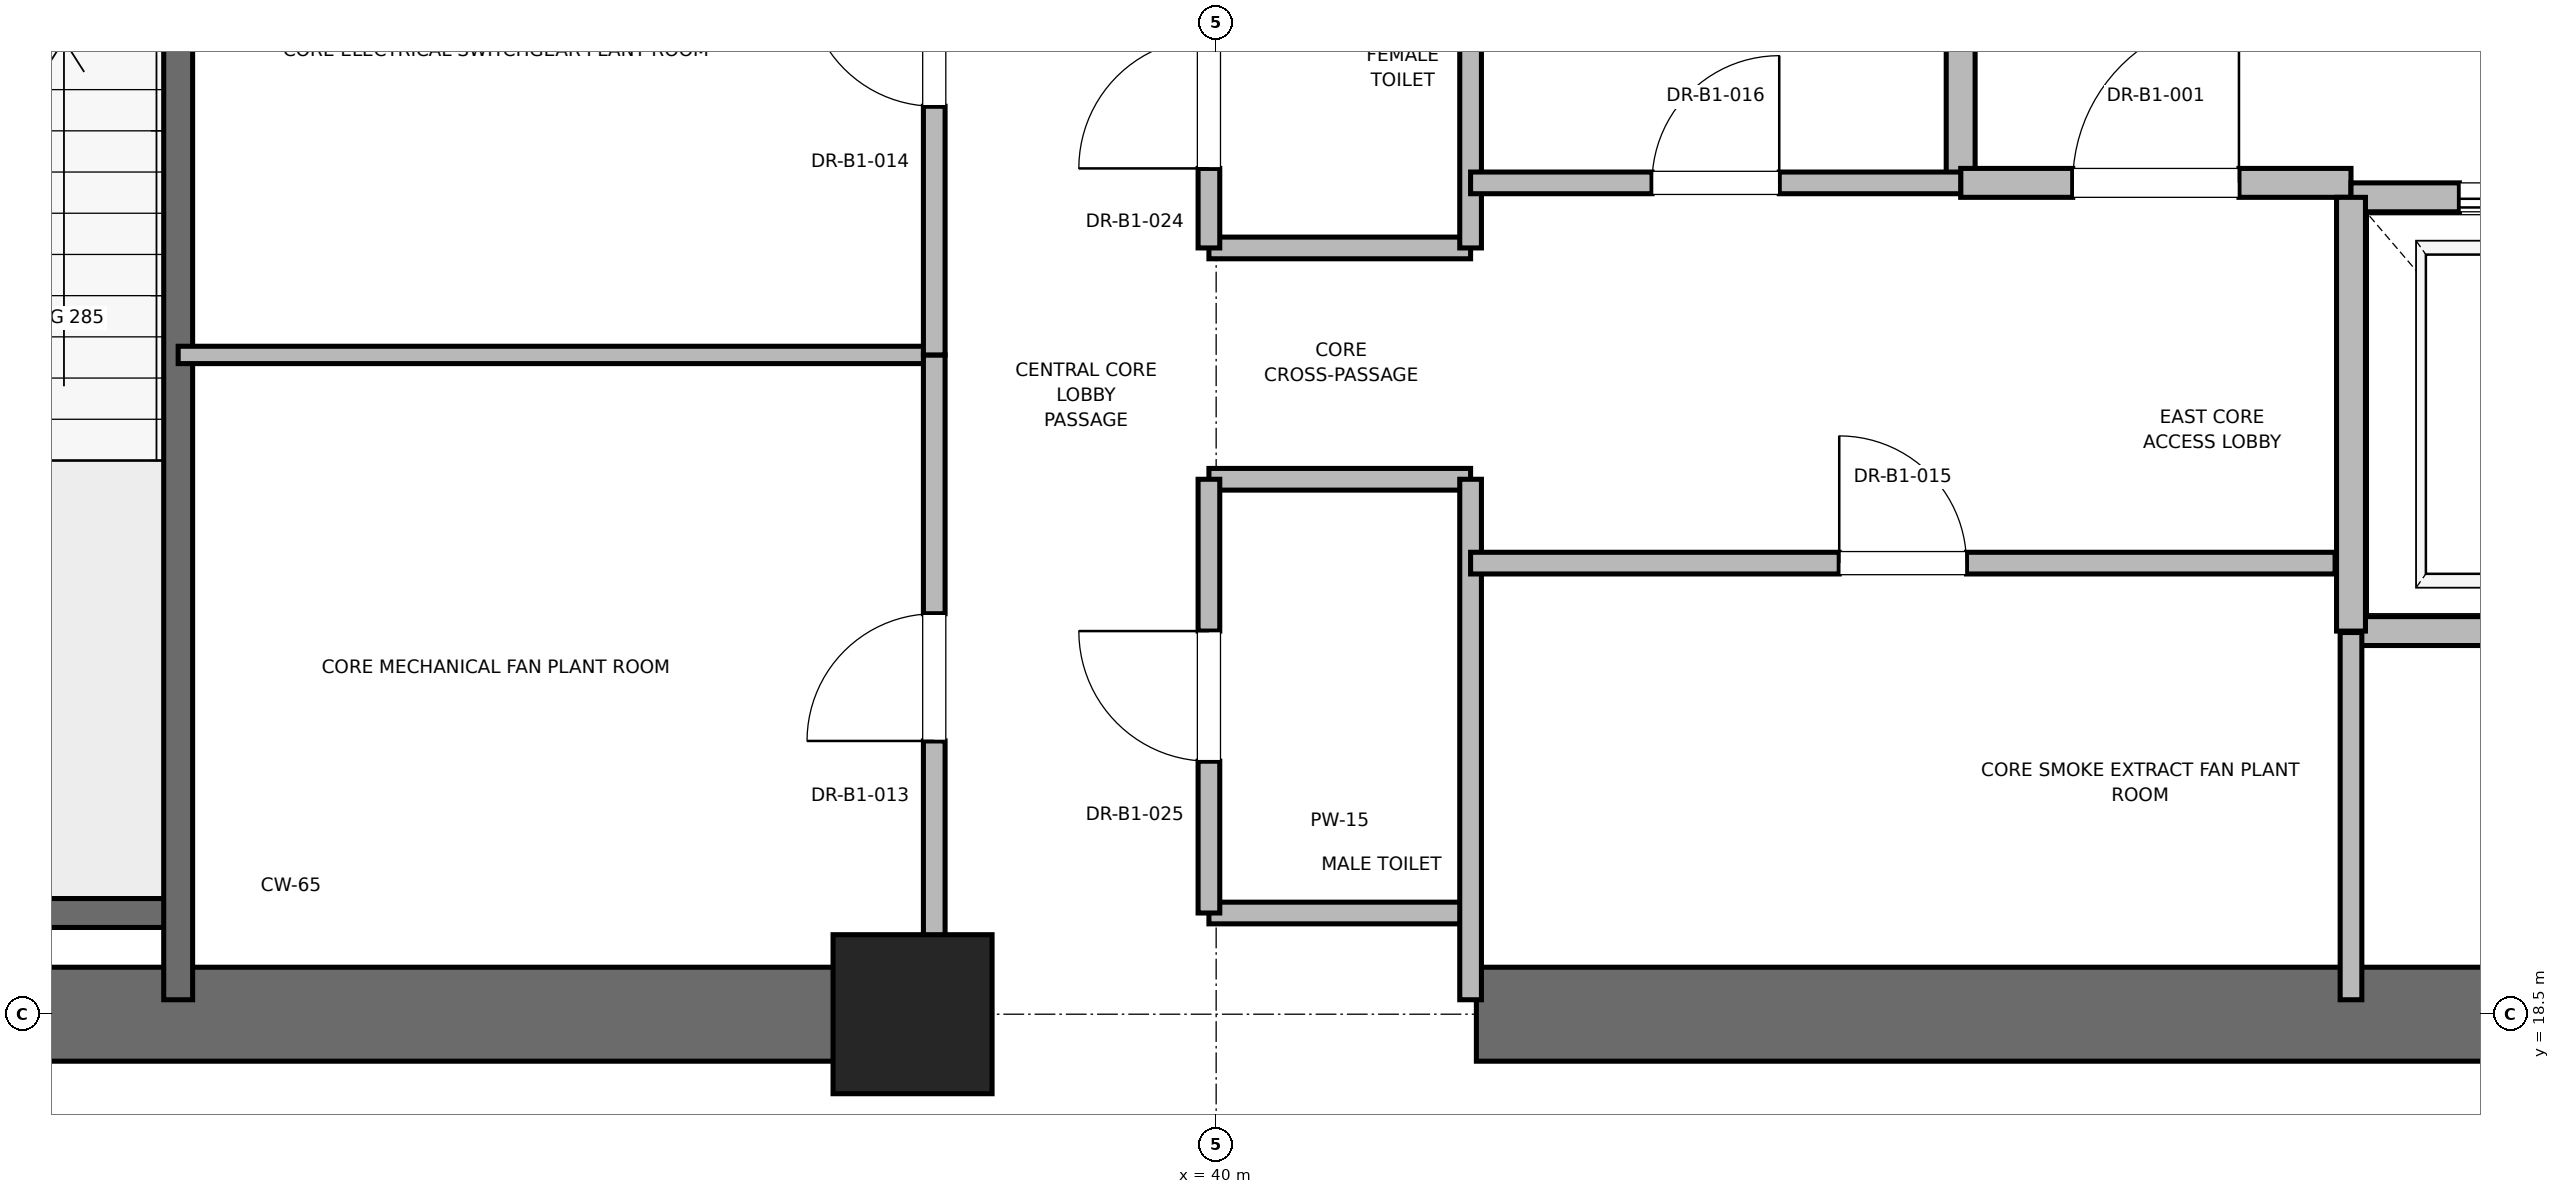
"""IFC4 building model, lengths in metres.
Left out: names, types, materials, properties, quantities, classifications, styles, units other than length and angle.
Written with IfcOpenShell. Run it as: python <this file> out.ifc"""

import sys

from ifc_helpers import new_model, si_unit, direction, frame, frame_2d, origin, origin_2d, place, context, subcontext, project, spatial, rectangle, extrude, element, fill, save


model = new_model("IFC4")
c1 = context("Model", 3, precision=1e-05, world=origin(), true_north=direction((0.0, 1.0)))
c2 = subcontext(c1, "Body", "Model", "MODEL_VIEW")
j1 = project(units=[si_unit("LENGTHUNIT", "METRE"), si_unit("PLANEANGLEUNIT", "RADIAN")], contexts=[c1])
p1 = place(None, origin())
s1 = spatial("IfcSite", under=j1, at=p1, CompositionType="ELEMENT")
p2 = place(p1, origin())
s2 = spatial("IfcBuilding", under=s1, at=p2, CompositionType="ELEMENT")
p3 = place(p2, frame((0.0, 0.0, -4.5)))
s3 = spatial("IfcBuildingStorey", under=s2, at=p3, CompositionType="ELEMENT", Elevation=-4.5)
p4 = place(p3, frame((37.9, 18.5, 0.0), z_axis=(0.0, 0.0, 1.0), x_axis=(1.0, 0.0, 0.0)))
e1 = element("IfcColumn", 1, at=p4, inside=s3, PredefinedType="PILASTER", context=c2, shape_type="SweptSolid", body=[
    extrude(rectangle(XDim=1.1, YDim=1.1, at=origin_2d()), origin(), (0.0, 0.0, 1.0), 4.5),
])
for number, where, z_axis, x_axis in (
    (2, (29.0, 18.5, 0.0), (0.0, 0.0, 1.0), (1.0, 0.0, 0.0)),
    (3, (41.8, 18.5, 0.0), (0.0, 0.0, 1.0), (1.0, 0.0, 0.0)),
):
    element("IfcWall", number, at=place(p3, frame(where, z_axis=z_axis, x_axis=x_axis)), inside=s3, PredefinedType="SHEAR", context=c2, shape_type="SweptSolid", body=[
        extrude(rectangle(XDim=9.2, YDim=0.65, at=frame_2d((4.6, 0.0))), origin(), (0.0, 0.0, 1.0), 4.22),
    ])
p5 = place(p3, frame((29.7, 19.2, 0.0), z_axis=(0.0, 0.0, 1.0), x_axis=(1.0, 0.0, 0.0)))
e4 = element("IfcWall", 4, at=p5, inside=s3, PredefinedType="SOLIDWALL", context=c2, shape_type="SweptSolid", body=[
    extrude(rectangle(XDim=3.12, YDim=0.2, at=frame_2d((1.56, 0.0))), origin(), (0.0, 0.0, 1.0), 4.22),
])
p6 = place(p3, frame((32.82, 18.6, 0.0), z_axis=(0.0, 0.0, 1.0), x_axis=(0.0, 1.0, 0.0)))
e5 = element("IfcWall", 5, at=p6, inside=s3, PredefinedType="SOLIDWALL", context=c2, shape_type="SweptSolid", body=[
    extrude(rectangle(XDim=8.78, YDim=0.2, at=frame_2d((4.39, 0.0))), origin(), (0.0, 0.0, 1.0), 4.22),
])
p7 = place(p3, frame((45.15, 24.25, 0.0), z_axis=(0.0, 0.0, 1.0), x_axis=(0.0, 1.0, 0.0)))
e6 = element("IfcWall", 6, at=p7, inside=s3, PredefinedType="PARTITIONING", context=c2, shape_type="SweptSolid", body=[
    extrude(rectangle(XDim=3.37, YDim=0.2, at=frame_2d((1.685, 0.0))), origin(), (0.0, 0.0, 1.0), 4.22),
])
p8 = place(p3, frame((45.15, 24.25, 0.0), z_axis=(0.0, 0.0, 1.0), x_axis=(1.0, 0.0, 0.0)))
e7 = element("IfcWall", 7, at=p8, inside=s3, PredefinedType="PARTITIONING", context=c2, shape_type="SweptSolid", body=[
    extrude(rectangle(XDim=2.7, YDim=0.2, at=frame_2d((1.35, 0.0))), origin(), (0.0, 0.0, 1.0), 4.22),
])
p9 = place(p8, frame((0.775, 0.0, 0.0)))
e8 = element("IfcOpeningElement", 8, at=p9, cuts=e7, PredefinedType="OPENING", context=c2, shape_type="SweptSolid", body=[
    extrude(rectangle(XDim=1.15, YDim=2.2, at=frame_2d((0.575, 1.1))), frame((0.0, 0.1, 0.0), z_axis=(0.0, -1.0, 0.0), x_axis=(1.0, 0.0, 0.0)), (0.0, 0.0, 1.0), 0.2),
])
p10 = place(p3, frame((47.85, 21.15, 0.0), z_axis=(0.0, 0.0, 1.0), x_axis=(1.0, 0.0, 0.0)))
e9 = element("IfcWall", 9, at=p10, inside=s3, PredefinedType="SOLIDWALL", context=c2, shape_type="SweptSolid", body=[
    extrude(rectangle(XDim=2.6, YDim=0.2, at=frame_2d((1.3, 0.0))), origin(), (0.0, 0.0, 1.0), 4.22),
])
p11 = place(p3, frame((50.45, 24.15, 0.0), z_axis=(0.0, 0.0, 1.0), x_axis=(-1.0, 0.0, 0.0)))
e10 = element("IfcWall", 10, at=p11, inside=s3, PredefinedType="SOLIDWALL", context=c2, shape_type="SweptSolid", body=[
    extrude(rectangle(XDim=2.6, YDim=0.2, at=frame_2d((1.3, 0.0))), origin(), (0.0, 0.0, 1.0), 3.0),
])
p12 = place(p11, frame((0.75, 0.0, 0.0)))
e11 = element("IfcOpeningElement", 11, at=p12, cuts=e10, PredefinedType="OPENING", context=c2, shape_type="SweptSolid", body=[
    extrude(rectangle(XDim=1.1, YDim=2.2, at=frame_2d((0.55, 1.1))), frame((0.0, 0.1, 0.0), z_axis=(0.0, -1.0, 0.0), x_axis=(1.0, 0.0, 0.0)), (0.0, 0.0, 1.0), 0.2),
])
p13 = place(p3, frame((47.85, 24.15, 0.0), z_axis=(0.0, 0.0, 1.0), x_axis=(0.0, -1.0, 0.0)))
e12 = element("IfcWall", 12, at=p13, inside=s3, PredefinedType="SOLIDWALL", context=c2, shape_type="SweptSolid", body=[
    extrude(rectangle(XDim=3.0, YDim=0.2, at=frame_2d((1.5, 0.0))), origin(), (0.0, 0.0, 1.0), 4.22),
])
for number, where, z_axis, x_axis in (
    (13, (39.95, 19.2, 0.0), (0.0, 0.0, 1.0), (1.0, 0.0, 0.0)),
    (14, (39.95, 22.2, 0.0), (0.0, 0.0, 1.0), (1.0, 0.0, 0.0)),
    (15, (39.95, 23.8, 0.0), (0.0, 0.0, 1.0), (1.0, 0.0, 0.0)),
):
    element("IfcWall", number, at=place(p3, frame(where, z_axis=z_axis, x_axis=x_axis)), inside=s3, PredefinedType="PARTITIONING", context=c2, shape_type="SweptSolid", body=[
        extrude(rectangle(XDim=1.81, YDim=0.15, at=frame_2d((0.905, 0.0))), origin(), (0.0, 0.0, 1.0), 2.85),
    ])
p14 = place(p3, frame((41.76, 18.6, 0.0), z_axis=(0.0, 0.0, 1.0), x_axis=(0.0, 1.0, 0.0)))
e16 = element("IfcWall", 16, at=p14, inside=s3, PredefinedType="PARTITIONING", context=c2, shape_type="SweptSolid", body=[
    extrude(rectangle(XDim=3.6, YDim=0.15, at=frame_2d((1.8, 0.0))), origin(), (0.0, 0.0, 1.0), 2.85),
])
p15 = place(p3, frame((41.76, 23.8, 0.0), z_axis=(0.0, 0.0, 1.0), x_axis=(0.0, 1.0, 0.0)))
e17 = element("IfcWall", 17, at=p15, inside=s3, PredefinedType="PARTITIONING", context=c2, shape_type="SweptSolid", body=[
    extrude(rectangle(XDim=4.0, YDim=0.15, at=frame_2d((2.0, 0.0))), origin(), (0.0, 0.0, 1.0), 2.85),
])
p16 = place(p3, frame((39.95, 19.2, 0.0), z_axis=(0.0, 0.0, 1.0), x_axis=(0.0, 1.0, 0.0)))
e18 = element("IfcWall", 18, at=p16, inside=s3, PredefinedType="PARTITIONING", context=c2, shape_type="SweptSolid", body=[
    extrude(rectangle(XDim=3.0, YDim=0.15, at=frame_2d((1.5, 0.0))), origin(), (0.0, 0.0, 1.0), 2.85),
])
p17 = place(p16, frame((1.05, 0.0, 0.0)))
e19 = element("IfcOpeningElement", 19, at=p17, cuts=e18, PredefinedType="OPENING", context=c2, shape_type="SweptSolid", body=[
    extrude(rectangle(XDim=0.9, YDim=2.1, at=frame_2d((0.45, 1.05))), frame((0.0, 0.075, 0.0), z_axis=(0.0, -1.0, 0.0), x_axis=(1.0, 0.0, 0.0)), (0.0, 0.0, 1.0), 0.15),
])
p18 = place(p3, frame((39.95, 23.8, 0.0), z_axis=(0.0, 0.0, 1.0), x_axis=(0.0, 1.0, 0.0)))
e20 = element("IfcWall", 20, at=p18, inside=s3, PredefinedType="PARTITIONING", context=c2, shape_type="SweptSolid", body=[
    extrude(rectangle(XDim=2.0, YDim=0.15, at=frame_2d((1.0, 0.0))), origin(), (0.0, 0.0, 1.0), 2.85),
])
p19 = place(p18, frame((0.55, 0.0, 0.0)))
e21 = element("IfcOpeningElement", 21, at=p19, cuts=e20, PredefinedType="OPENING", context=c2, shape_type="SweptSolid", body=[
    extrude(rectangle(XDim=0.9, YDim=2.1, at=frame_2d((0.45, 1.05))), frame((0.0, 0.075, 0.0), z_axis=(0.0, -1.0, 0.0), x_axis=(1.0, 0.0, 0.0)), (0.0, 0.0, 1.0), 0.15),
])
p20 = place(p3, frame((32.82, 23.06, 0.0), z_axis=(0.0, 0.0, 1.0), x_axis=(1.0, 0.0, 0.0)))
e22 = element("IfcWall", 22, at=p20, inside=s3, PredefinedType="PARTITIONING", context=c2, shape_type="SweptSolid", body=[
    extrude(rectangle(XDim=5.23, YDim=0.12, at=frame_2d((2.615, 0.0))), origin(), (0.0, 0.0, 1.0), 2.85),
])
p21 = place(p3, frame((38.05, 18.6, 0.0), z_axis=(0.0, 0.0, 1.0), x_axis=(0.0, 1.0, 0.0)))
e23 = element("IfcWall", 23, at=p21, inside=s3, PredefinedType="PARTITIONING", context=c2, shape_type="SweptSolid", body=[
    extrude(rectangle(XDim=4.46, YDim=0.15, at=frame_2d((2.23, 0.0))), origin(), (0.0, 0.0, 1.0), 2.85),
])
p22 = place(p21, frame((1.79, 0.0, 0.0)))
e24 = element("IfcOpeningElement", 24, at=p22, cuts=e23, PredefinedType="OPENING", context=c2, shape_type="SweptSolid", body=[
    extrude(rectangle(XDim=0.88, YDim=2.1, at=frame_2d((0.44, 1.05))), frame((0.0, 0.075, 0.0), z_axis=(0.0, -1.0, 0.0), x_axis=(1.0, 0.0, 0.0)), (0.0, 0.0, 1.0), 0.15),
])
p23 = place(p3, frame((38.05, 23.06, 0.0), z_axis=(0.0, 0.0, 1.0), x_axis=(0.0, 1.0, 0.0)))
e25 = element("IfcWall", 25, at=p23, inside=s3, PredefinedType="PARTITIONING", context=c2, shape_type="SweptSolid", body=[
    extrude(rectangle(XDim=4.32, YDim=0.15, at=frame_2d((2.16, 0.0))), origin(), (0.0, 0.0, 1.0), 2.85),
])
p24 = place(p23, frame((1.72, 0.0, 0.0)))
e26 = element("IfcOpeningElement", 26, at=p24, cuts=e25, PredefinedType="OPENING", context=c2, shape_type="SweptSolid", body=[
    extrude(rectangle(XDim=0.88, YDim=2.1, at=frame_2d((0.44, 1.05))), frame((0.0, 0.075, 0.0), z_axis=(0.0, -1.0, 0.0), x_axis=(1.0, 0.0, 0.0)), (0.0, 0.0, 1.0), 0.15),
])
p25 = place(p3, frame((47.85, 18.6, 0.0), z_axis=(0.0, 0.0, 1.0), x_axis=(0.0, 1.0, 0.0)))
e27 = element("IfcWall", 27, at=p25, inside=s3, PredefinedType="PARTITIONING", context=c2, shape_type="SweptSolid", body=[
    extrude(rectangle(XDim=2.54, YDim=0.15, at=frame_2d((1.27, 0.0))), origin(), (0.0, 0.0, 1.0), 2.85),
])
p26 = place(p3, frame((41.76, 21.62, 0.0), z_axis=(0.0, 0.0, 1.0), x_axis=(1.0, 0.0, 0.0)))
e28 = element("IfcWall", 28, at=p26, inside=s3, PredefinedType="PARTITIONING", context=c2, shape_type="SweptSolid", body=[
    extrude(rectangle(XDim=5.98, YDim=0.15, at=frame_2d((2.99, 0.0))), origin(), (0.0, 0.0, 1.0), 2.85),
])
p27 = place(p26, frame((2.55, 0.0, 0.0)))
e29 = element("IfcOpeningElement", 29, at=p27, cuts=e28, PredefinedType="OPENING", context=c2, shape_type="SweptSolid", body=[
    extrude(rectangle(XDim=0.88, YDim=2.1, at=frame_2d((0.44, 1.05))), frame((0.0, 0.075, 0.0), z_axis=(0.0, -1.0, 0.0), x_axis=(1.0, 0.0, 0.0)), (0.0, 0.0, 1.0), 0.15),
])
p28 = place(p3, frame((41.76, 24.25, 0.0), z_axis=(0.0, 0.0, 1.0), x_axis=(1.0, 0.0, 0.0)))
e30 = element("IfcWall", 30, at=p28, inside=s3, PredefinedType="PARTITIONING", context=c2, shape_type="SweptSolid", body=[
    extrude(rectangle(XDim=3.39, YDim=0.15, at=frame_2d((1.695, 0.0))), origin(), (0.0, 0.0, 1.0), 2.85),
])
p29 = place(p28, frame((1.255, 0.0, 0.0)))
e31 = element("IfcOpeningElement", 31, at=p29, cuts=e30, PredefinedType="OPENING", context=c2, shape_type="SweptSolid", body=[
    extrude(rectangle(XDim=0.88, YDim=2.1, at=frame_2d((0.44, 1.05))), frame((0.0, 0.075, 0.0), z_axis=(0.0, -1.0, 0.0), x_axis=(1.0, 0.0, 0.0)), (0.0, 0.0, 1.0), 0.15),
])
p30 = place(p9, origin())
e32 = element("IfcDoor", 32, at=p30, inside=s3, OperationType="SINGLE_SWING_RIGHT", PredefinedType="DOOR", context=c2, shape_type="SweptSolid", body=[
    extrude(rectangle(XDim=1.15, YDim=2.2, at=frame_2d((0.575, 1.1))), frame((0.0, 0.025, 0.0), z_axis=(0.0, -1.0, 0.0), x_axis=(1.0, 0.0, 0.0)), (0.0, 0.0, 1.0), 0.05),
])
fill(e8, e32)
p31 = place(p12, origin())
e33 = element("IfcDoor", 33, at=p31, inside=s3, OperationType="SLIDING_TO_RIGHT", PredefinedType="DOOR", context=c2, shape_type="SweptSolid", body=[
    extrude(rectangle(XDim=1.1, YDim=2.2, at=frame_2d((0.55, 1.1))), frame((0.0, 0.025, 0.0), z_axis=(0.0, -1.0, 0.0), x_axis=(1.0, 0.0, 0.0)), (0.0, 0.0, 1.0), 0.05),
])
fill(e11, e33)
p32 = place(p17, origin())
e34 = element("IfcDoor", 34, at=p32, inside=s3, OperationType="SINGLE_SWING_RIGHT", PredefinedType="DOOR", context=c2, shape_type="SweptSolid", body=[
    extrude(rectangle(XDim=0.9, YDim=2.1, at=frame_2d((0.45, 1.05))), frame((0.0, 0.025, 0.0), z_axis=(0.0, -1.0, 0.0), x_axis=(1.0, 0.0, 0.0)), (0.0, 0.0, 1.0), 0.05),
])
fill(e19, e34)
p33 = place(p19, origin())
e35 = element("IfcDoor", 35, at=p33, inside=s3, OperationType="SINGLE_SWING_LEFT", PredefinedType="DOOR", context=c2, shape_type="SweptSolid", body=[
    extrude(rectangle(XDim=0.9, YDim=2.1, at=frame_2d((0.45, 1.05))), frame((0.0, 0.025, 0.0), z_axis=(0.0, -1.0, 0.0), x_axis=(1.0, 0.0, 0.0)), (0.0, 0.0, 1.0), 0.05),
])
fill(e21, e35)
p34 = place(p22, origin())
e36 = element("IfcDoor", 36, at=p34, inside=s3, OperationType="SINGLE_SWING_LEFT", PredefinedType="DOOR", context=c2, shape_type="SweptSolid", body=[
    extrude(rectangle(XDim=0.88, YDim=2.1, at=frame_2d((0.44, 1.05))), frame((0.0, 0.025, 0.0), z_axis=(0.0, -1.0, 0.0), x_axis=(1.0, 0.0, 0.0)), (0.0, 0.0, 1.0), 0.05),
])
fill(e24, e36)
p35 = place(p24, origin())
e37 = element("IfcDoor", 37, at=p35, inside=s3, OperationType="SINGLE_SWING_RIGHT", PredefinedType="DOOR", context=c2, shape_type="SweptSolid", body=[
    extrude(rectangle(XDim=0.88, YDim=2.1, at=frame_2d((0.44, 1.05))), frame((0.0, 0.025, 0.0), z_axis=(0.0, -1.0, 0.0), x_axis=(1.0, 0.0, 0.0)), (0.0, 0.0, 1.0), 0.05),
])
fill(e26, e37)
p36 = place(p27, origin())
e38 = element("IfcDoor", 38, at=p36, inside=s3, OperationType="SINGLE_SWING_LEFT", PredefinedType="DOOR", context=c2, shape_type="SweptSolid", body=[
    extrude(rectangle(XDim=0.88, YDim=2.1, at=frame_2d((0.44, 1.05))), frame((0.0, 0.025, 0.0), z_axis=(0.0, -1.0, 0.0), x_axis=(1.0, 0.0, 0.0)), (0.0, 0.0, 1.0), 0.05),
])
fill(e29, e38)
p37 = place(p29, origin())
e39 = element("IfcDoor", 39, at=p37, inside=s3, OperationType="SINGLE_SWING_RIGHT", PredefinedType="DOOR", context=c2, shape_type="SweptSolid", body=[
    extrude(rectangle(XDim=0.88, YDim=2.1, at=frame_2d((0.44, 1.05))), frame((0.0, 0.025, 0.0), z_axis=(0.0, -1.0, 0.0), x_axis=(1.0, 0.0, 0.0)), (0.0, 0.0, 1.0), 0.05),
])
fill(e31, e39)
save(model, sys.argv[1])
